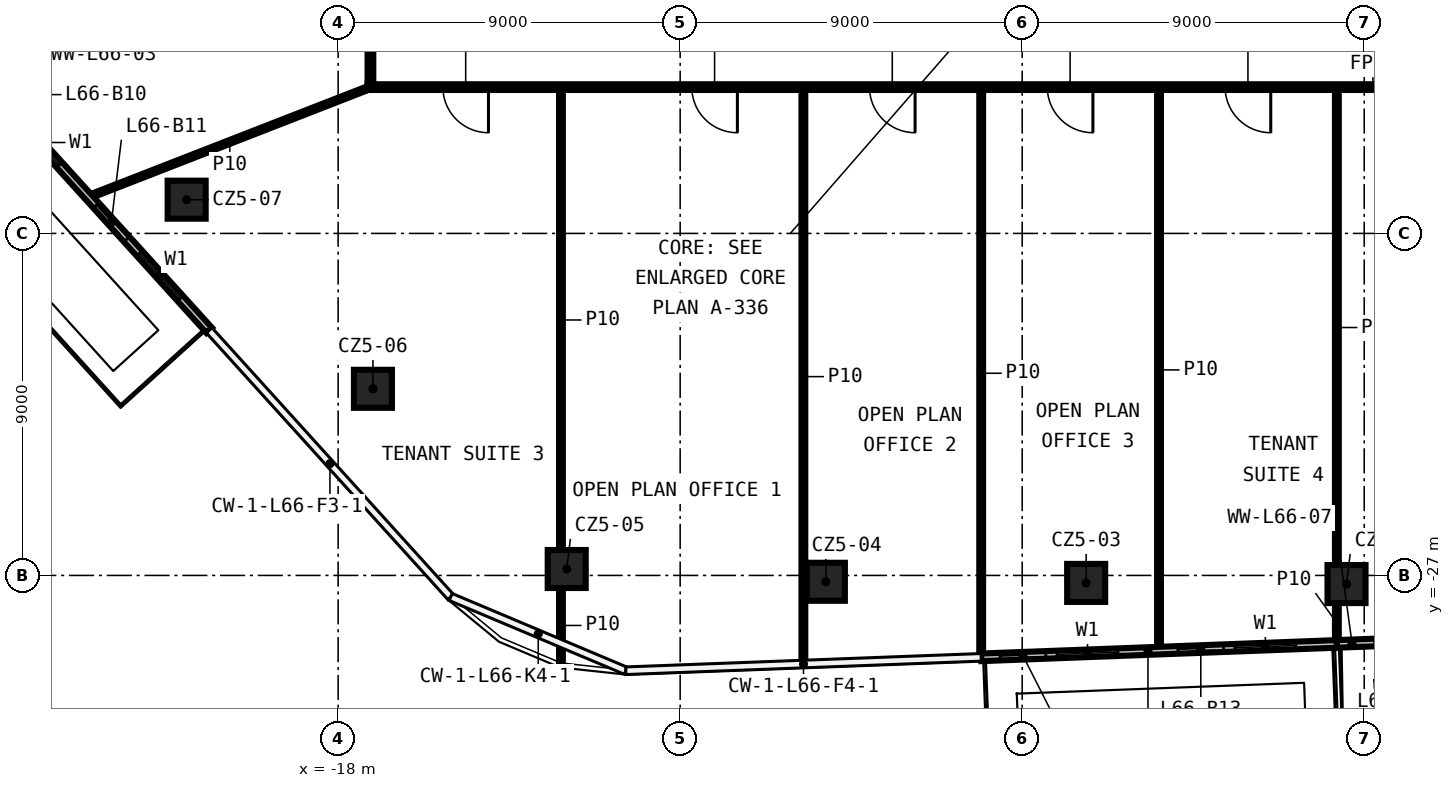
"""IFC4 building model, lengths in metres.
Left out: names, types, materials, properties, quantities, classifications, styles, units other than length and angle.
Written with IfcOpenShell. Run it as: python <this file> out.ifc"""

import sys

from ifc_helpers import new_model, si_unit, direction, frame, frame_2d, origin, origin_2d, place, context, subcontext, project, spatial, rectangle, extrude, element, fill, save


model = new_model("IFC4")
c1 = context("Model", 3, precision=1e-05, world=origin(), true_north=direction((0.0, 1.0)))
c2 = subcontext(c1, "Body", "Model", "MODEL_VIEW")
j1 = project(units=[si_unit("LENGTHUNIT", "METRE"), si_unit("PLANEANGLEUNIT", "RADIAN")], contexts=[c1])
p1 = place(None, origin())
s1 = spatial("IfcSite", under=j1, at=p1, CompositionType="ELEMENT")
p2 = place(p1, origin())
s2 = spatial("IfcBuilding", under=s1, at=p2, CompositionType="ELEMENT")
p3 = place(p2, frame((0.0, 0.0, 311.0)))
s3 = spatial("IfcBuildingStorey", under=s2, at=p3, CompositionType="ELEMENT", Elevation=311.0)
for number, where, z_axis, x_axis in (
    (1, (8.534, -27.227, 0.0), (0.0, 0.0, 1.0), (1.0, 0.0, 0.0)),
    (2, (1.683, -27.197, 0.0), (0.0, 0.0, 1.0), (1.0, 0.0, 0.0)),
    (3, (-5.166, -27.167, 0.0), (0.0, 0.0, 1.0), (1.0, 0.0, 0.0)),
    (4, (-11.985, -26.831, 0.0), (0.0, 0.0, 1.0), (1.0, 0.0, 0.0)),
    (5, (-17.084, -22.089, 0.0), (0.0, 0.0, 1.0), (1.0, 0.0, 0.0)),
    (6, (-21.986, -17.112, 0.0), (0.0, 0.0, 1.0), (1.0, 0.0, 0.0)),
):
    element("IfcColumn", number, at=place(p3, frame(where, z_axis=z_axis, x_axis=x_axis)), inside=s3, PredefinedType="COLUMN", context=c2, shape_type="SweptSolid", body=[
        extrude(rectangle(XDim=1.0, YDim=1.0, at=origin_2d()), origin(), (0.0, 0.0, 1.0), 3.82),
    ])
p4 = place(p3, frame((17.225, -14.15, 0.0), z_axis=(0.0, 0.0, 1.0), x_axis=(-1.0, 0.0, 0.0)))
e7 = element("IfcWall", 7, at=p4, inside=s3, PredefinedType="PARTITIONING", context=c2, shape_type="SweptSolid", body=[
    extrude(rectangle(XDim=34.45, YDim=0.15, at=frame_2d((17.225, 0.0))), origin(), (0.0, 0.0, 1.0), 3.82),
])
p5 = place(p4, frame((31.269, 0.0, 0.0)))
e8 = element("IfcOpeningElement", 8, at=p5, cuts=e7, PredefinedType="OPENING", context=c2, shape_type="SweptSolid", body=[
    extrude(rectangle(XDim=1.2, YDim=2.1, at=frame_2d((0.6, 1.05))), frame((0.0, 0.085, 0.0), z_axis=(0.0, -1.0, 0.0), x_axis=(1.0, 0.0, 0.0)), (0.0, 0.0, 1.0), 0.17),
])
p6 = place(p4, frame((24.719, 0.0, 0.0)))
e9 = element("IfcOpeningElement", 9, at=p6, cuts=e7, PredefinedType="OPENING", context=c2, shape_type="SweptSolid", body=[
    extrude(rectangle(XDim=1.2, YDim=2.1, at=frame_2d((0.6, 1.05))), frame((0.0, 0.085, 0.0), z_axis=(0.0, -1.0, 0.0), x_axis=(1.0, 0.0, 0.0)), (0.0, 0.0, 1.0), 0.17),
])
p7 = place(p4, frame((20.044, 0.0, 0.0)))
e10 = element("IfcOpeningElement", 10, at=p7, cuts=e7, PredefinedType="OPENING", context=c2, shape_type="SweptSolid", body=[
    extrude(rectangle(XDim=1.2, YDim=2.1, at=frame_2d((0.6, 1.05))), frame((0.0, 0.085, 0.0), z_axis=(0.0, -1.0, 0.0), x_axis=(1.0, 0.0, 0.0)), (0.0, 0.0, 1.0), 0.17),
])
p8 = place(p4, frame((15.364, 0.0, 0.0)))
e11 = element("IfcOpeningElement", 11, at=p8, cuts=e7, PredefinedType="OPENING", context=c2, shape_type="SweptSolid", body=[
    extrude(rectangle(XDim=1.2, YDim=2.1, at=frame_2d((0.6, 1.05))), frame((0.0, 0.085, 0.0), z_axis=(0.0, -1.0, 0.0), x_axis=(1.0, 0.0, 0.0)), (0.0, 0.0, 1.0), 0.17),
])
p9 = place(p4, frame((10.685, 0.0, 0.0)))
e12 = element("IfcOpeningElement", 12, at=p9, cuts=e7, PredefinedType="OPENING", context=c2, shape_type="SweptSolid", body=[
    extrude(rectangle(XDim=1.2, YDim=2.1, at=frame_2d((0.6, 1.05))), frame((0.0, 0.085, 0.0), z_axis=(0.0, -1.0, 0.0), x_axis=(1.0, 0.0, 0.0)), (0.0, 0.0, 1.0), 0.17),
])
p10 = place(p4, frame((4.107, 0.0, 0.0)))
e13 = element("IfcOpeningElement", 13, at=p10, cuts=e7, PredefinedType="OPENING", context=c2, shape_type="SweptSolid", body=[
    extrude(rectangle(XDim=1.2, YDim=2.1, at=frame_2d((0.6, 1.05))), frame((0.0, 0.085, 0.0), z_axis=(0.0, -1.0, 0.0), x_axis=(1.0, 0.0, 0.0)), (0.0, 0.0, 1.0), 0.17),
])
p11 = place(p3, frame((-24.55, -17.033, 0.0), z_axis=(0.0, 0.0, 1.0), x_axis=(0.931751191714, 0.363097392911, 0.0)))
e14 = element("IfcWall", 14, at=p11, inside=s3, PredefinedType="PARTITIONING", context=c2, shape_type="SweptSolid", body=[
    extrude(rectangle(XDim=7.942, YDim=0.1, at=frame_2d((3.971, 0.0))), origin(), (0.0, 0.0, 1.0), 3.82),
])
p12 = place(p3, frame((8.28, -28.782, 0.0), z_axis=(0.0, 0.0, 1.0), x_axis=(0.0, 1.0, 0.0)))
e15 = element("IfcWall", 15, at=p12, inside=s3, PredefinedType="PARTITIONING", context=c2, shape_type="SweptSolid", body=[
    extrude(rectangle(XDim=1.055, YDim=0.1, at=frame_2d((0.528, 0.0))), origin(), (0.0, 0.0, 1.0), 3.82),
])
p13 = place(p3, frame((8.28, -26.727, 0.0), z_axis=(0.0, 0.0, 1.0), x_axis=(0.0, 1.0, 0.0)))
e16 = element("IfcWall", 16, at=p13, inside=s3, PredefinedType="PARTITIONING", context=c2, shape_type="SweptSolid", body=[
    extrude(rectangle(XDim=12.502, YDim=0.1, at=frame_2d((6.251, 0.0))), origin(), (0.0, 0.0, 1.0), 3.82),
])
p14 = place(p3, frame((3.6, -28.959, 0.0), z_axis=(0.0, 0.0, 1.0), x_axis=(0.0, 1.0, 0.0)))
e17 = element("IfcWall", 17, at=p14, inside=s3, PredefinedType="PARTITIONING", context=c2, shape_type="SweptSolid", body=[
    extrude(rectangle(XDim=14.734, YDim=0.1, at=frame_2d((7.367, 0.0))), origin(), (0.0, 0.0, 1.0), 3.82),
])
p15 = place(p3, frame((-1.079, -29.135, 0.0), z_axis=(0.0, 0.0, 1.0), x_axis=(0.0, 1.0, 0.0)))
e18 = element("IfcWall", 18, at=p15, inside=s3, PredefinedType="PARTITIONING", context=c2, shape_type="SweptSolid", body=[
    extrude(rectangle(XDim=14.91, YDim=0.1, at=frame_2d((7.455, 0.0))), origin(), (0.0, 0.0, 1.0), 3.82),
])
p16 = place(p3, frame((-5.758, -29.312, 0.0), z_axis=(0.0, 0.0, 1.0), x_axis=(0.0, 1.0, 0.0)))
e19 = element("IfcWall", 19, at=p16, inside=s3, PredefinedType="PARTITIONING", context=c2, shape_type="SweptSolid", body=[
    extrude(rectangle(XDim=15.087, YDim=0.1, at=frame_2d((7.543, 0.0))), origin(), (0.0, 0.0, 1.0), 3.82),
])
p17 = place(p3, frame((-12.137, -29.302, 0.0), z_axis=(0.0, 0.0, 1.0), x_axis=(0.0, 1.0, 0.0)))
e20 = element("IfcWall", 20, at=p17, inside=s3, PredefinedType="PARTITIONING", context=c2, shape_type="SweptSolid", body=[
    extrude(rectangle(XDim=1.971, YDim=0.1, at=frame_2d((0.985, 0.0))), origin(), (0.0, 0.0, 1.0), 3.82),
])
p18 = place(p3, frame((-12.137, -26.331, 0.0), z_axis=(0.0, 0.0, 1.0), x_axis=(0.0, 1.0, 0.0)))
e21 = element("IfcWall", 21, at=p18, inside=s3, PredefinedType="PARTITIONING", context=c2, shape_type="SweptSolid", body=[
    extrude(rectangle(XDim=12.106, YDim=0.1, at=frame_2d((6.053, 0.0))), origin(), (0.0, 0.0, 1.0), 3.82),
])
p19 = place(p3, frame((-17.15, -14.075, 0.0), z_axis=(0.0, 0.0, 1.0), x_axis=(0.0, 1.0, 0.0)))
e22 = element("IfcWall", 22, at=p19, inside=s3, PredefinedType="PARTITIONING", context=c2, shape_type="SweptSolid", body=[
    extrude(rectangle(XDim=28.15, YDim=0.15, at=frame_2d((14.075, 0.0))), origin(), (0.0, 0.0, 1.0), 3.82),
])
p20 = place(p19, frame((10.867, 0.0, 0.0)))
e23 = element("IfcOpeningElement", 23, at=p20, cuts=e22, PredefinedType="OPENING", context=c2, shape_type="SweptSolid", body=[
    extrude(rectangle(XDim=1.2, YDim=2.1, at=frame_2d((0.6, 1.05))), frame((0.0, 0.085, 0.0), z_axis=(0.0, -1.0, 0.0), x_axis=(1.0, 0.0, 0.0)), (0.0, 0.0, 1.0), 0.17),
])
p21 = place(p19, frame((3.801, 0.0, 0.0)))
e24 = element("IfcOpeningElement", 24, at=p21, cuts=e22, PredefinedType="OPENING", context=c2, shape_type="SweptSolid", body=[
    extrude(rectangle(XDim=1.2, YDim=2.1, at=frame_2d((0.6, 1.05))), frame((0.0, 0.085, 0.0), z_axis=(0.0, -1.0, 0.0), x_axis=(1.0, 0.0, 0.0)), (0.0, 0.0, 1.0), 0.17),
])
p22 = place(p19, frame((18.279, 0.0, 0.0)))
e25 = element("IfcOpeningElement", 25, at=p22, cuts=e22, PredefinedType="OPENING", context=c2, shape_type="SweptSolid", body=[
    extrude(rectangle(XDim=1.2, YDim=2.1, at=frame_2d((0.6, 1.05))), frame((0.0, 0.085, 0.0), z_axis=(0.0, -1.0, 0.0), x_axis=(1.0, 0.0, 0.0)), (0.0, 0.0, 1.0), 0.17),
])
p23 = place(p3, frame((-30.926, -10.023, 0.0), z_axis=(0.0, 0.0, 1.0), x_axis=(0.671222052588, -0.74125633631, 0.0)))
e26 = element("IfcWall", 26, at=p23, inside=s3, PredefinedType="SOLIDWALL", context=c2, shape_type="SweptSolid", body=[
    extrude(rectangle(XDim=14.202, YDim=0.2, at=frame_2d((7.101, 0.0))), origin(), (0.0, 0.0, 1.0), 3.82),
])
p24 = place(p23, frame((2.0, 0.0, 0.6)))
e27 = element("IfcOpeningElement", 27, at=p24, cuts=e26, PredefinedType="OPENING", context=c2, shape_type="SweptSolid", body=[
    extrude(rectangle(XDim=1.6, YDim=2.4, at=frame_2d((0.8, 1.2))), frame((0.0, 0.11, 0.0), z_axis=(0.0, -1.0, 0.0), x_axis=(1.0, 0.0, 0.0)), (0.0, 0.0, 1.0), 0.22),
])
p25 = place(p23, frame((0.5, 0.0, 0.0)))
e28 = element("IfcOpeningElement", 28, at=p25, cuts=e26, PredefinedType="OPENING", context=c2, shape_type="SweptSolid", body=[
    extrude(rectangle(XDim=1.2, YDim=2.4, at=frame_2d((0.6, 1.2))), frame((0.0, 0.11, 0.0), z_axis=(0.0, -1.0, 0.0), x_axis=(1.0, 0.0, 0.0)), (0.0, 0.0, 1.0), 0.22),
])
p26 = place(p23, frame((6.734, 0.0, 0.6)))
e29 = element("IfcOpeningElement", 29, at=p26, cuts=e26, PredefinedType="OPENING", context=c2, shape_type="SweptSolid", body=[
    extrude(rectangle(XDim=1.6, YDim=2.4, at=frame_2d((0.8, 1.2))), frame((0.0, 0.11, 0.0), z_axis=(0.0, -1.0, 0.0), x_axis=(1.0, 0.0, 0.0)), (0.0, 0.0, 1.0), 0.22),
])
p27 = place(p23, frame((5.234, 0.0, 0.0)))
e30 = element("IfcOpeningElement", 30, at=p27, cuts=e26, PredefinedType="OPENING", context=c2, shape_type="SweptSolid", body=[
    extrude(rectangle(XDim=1.2, YDim=2.4, at=frame_2d((0.6, 1.2))), frame((0.0, 0.11, 0.0), z_axis=(0.0, -1.0, 0.0), x_axis=(1.0, 0.0, 0.0)), (0.0, 0.0, 1.0), 0.22),
])
p28 = place(p23, frame((11.468, 0.0, 0.6)))
e31 = element("IfcOpeningElement", 31, at=p28, cuts=e26, PredefinedType="OPENING", context=c2, shape_type="SweptSolid", body=[
    extrude(rectangle(XDim=1.6, YDim=2.4, at=frame_2d((0.8, 1.2))), frame((0.0, 0.11, 0.0), z_axis=(0.0, -1.0, 0.0), x_axis=(1.0, 0.0, 0.0)), (0.0, 0.0, 1.0), 0.22),
])
p29 = place(p23, frame((9.768, 0.0, 0.0)))
e32 = element("IfcOpeningElement", 32, at=p29, cuts=e26, PredefinedType="OPENING", context=c2, shape_type="SweptSolid", body=[
    extrude(rectangle(XDim=1.2, YDim=2.4, at=frame_2d((0.6, 1.2))), frame((0.0, 0.11, 0.0), z_axis=(0.0, -1.0, 0.0), x_axis=(1.0, 0.0, 0.0)), (0.0, 0.0, 1.0), 0.22),
])
p30 = place(p3, frame((-1.079, -29.156, 0.0), z_axis=(0.0, 0.0, 1.0), x_axis=(0.999288261827, 0.037722271597, 0.0)))
e33 = element("IfcWall", 33, at=p30, inside=s3, PredefinedType="SOLIDWALL", context=c2, shape_type="SweptSolid", body=[
    extrude(rectangle(XDim=9.365, YDim=0.2, at=frame_2d((4.683, 0.0))), origin(), (0.0, 0.0, 1.0), 3.82),
])
p31 = place(p30, frame((2.0, 0.0, 0.6)))
e34 = element("IfcOpeningElement", 34, at=p31, cuts=e33, PredefinedType="OPENING", context=c2, shape_type="SweptSolid", body=[
    extrude(rectangle(XDim=1.6, YDim=2.4, at=frame_2d((0.8, 1.2))), frame((0.0, 0.11, 0.0), z_axis=(0.0, -1.0, 0.0), x_axis=(1.0, 0.0, 0.0)), (0.0, 0.0, 1.0), 0.22),
])
p32 = place(p30, frame((0.5, 0.0, 0.0)))
e35 = element("IfcOpeningElement", 35, at=p32, cuts=e33, PredefinedType="OPENING", context=c2, shape_type="SweptSolid", body=[
    extrude(rectangle(XDim=1.2, YDim=2.4, at=frame_2d((0.6, 1.2))), frame((0.0, 0.11, 0.0), z_axis=(0.0, -1.0, 0.0), x_axis=(1.0, 0.0, 0.0)), (0.0, 0.0, 1.0), 0.22),
])
p33 = place(p30, frame((6.683, 0.0, 0.6)))
e36 = element("IfcOpeningElement", 36, at=p33, cuts=e33, PredefinedType="OPENING", context=c2, shape_type="SweptSolid", body=[
    extrude(rectangle(XDim=1.6, YDim=2.4, at=frame_2d((0.8, 1.2))), frame((0.0, 0.11, 0.0), z_axis=(0.0, -1.0, 0.0), x_axis=(1.0, 0.0, 0.0)), (0.0, 0.0, 1.0), 0.22),
])
p34 = place(p30, frame((5.183, 0.0, 0.0)))
e37 = element("IfcOpeningElement", 37, at=p34, cuts=e33, PredefinedType="OPENING", context=c2, shape_type="SweptSolid", body=[
    extrude(rectangle(XDim=1.2, YDim=2.4, at=frame_2d((0.6, 1.2))), frame((0.0, 0.11, 0.0), z_axis=(0.0, -1.0, 0.0), x_axis=(1.0, 0.0, 0.0)), (0.0, 0.0, 1.0), 0.22),
])
p35 = place(p3, frame((8.28, -28.802, 0.0), z_axis=(0.0, 0.0, 1.0), x_axis=(0.999288539502, 0.037714915082, 0.0)))
e38 = element("IfcWall", 38, at=p35, inside=s3, PredefinedType="SOLIDWALL", context=c2, shape_type="SweptSolid", body=[
    extrude(rectangle(XDim=4.674, YDim=0.2, at=frame_2d((2.337, 0.0))), origin(), (0.0, 0.0, 1.0), 3.82),
])
p36 = place(p35, frame((2.5, 0.0, 0.6)))
e39 = element("IfcOpeningElement", 39, at=p36, cuts=e38, PredefinedType="OPENING", context=c2, shape_type="SweptSolid", body=[
    extrude(rectangle(XDim=1.6, YDim=2.4, at=frame_2d((0.8, 1.2))), frame((0.0, 0.11, 0.0), z_axis=(0.0, -1.0, 0.0), x_axis=(1.0, 0.0, 0.0)), (0.0, 0.0, 1.0), 0.22),
])
p37 = place(p35, frame((1.0, 0.0, 0.0)))
e40 = element("IfcOpeningElement", 40, at=p37, cuts=e38, PredefinedType="OPENING", context=c2, shape_type="SweptSolid", body=[
    extrude(rectangle(XDim=1.2, YDim=2.4, at=frame_2d((0.6, 1.2))), frame((0.0, 0.11, 0.0), z_axis=(0.0, -1.0, 0.0), x_axis=(1.0, 0.0, 0.0)), (0.0, 0.0, 1.0), 0.22),
])
p38 = place(p5, origin())
e41 = element("IfcDoor", 41, at=p38, inside=s3, OperationType="SINGLE_SWING_RIGHT", PredefinedType="DOOR", context=c2, shape_type="SweptSolid", body=[
    extrude(rectangle(XDim=1.2, YDim=2.1, at=frame_2d((0.6, 1.05))), frame((0.0, 0.025, 0.0), z_axis=(0.0, -1.0, 0.0), x_axis=(1.0, 0.0, 0.0)), (0.0, 0.0, 1.0), 0.05),
])
fill(e8, e41)
p39 = place(p6, origin())
e42 = element("IfcDoor", 42, at=p39, inside=s3, OperationType="SINGLE_SWING_LEFT", PredefinedType="DOOR", context=c2, shape_type="SweptSolid", body=[
    extrude(rectangle(XDim=1.2, YDim=2.1, at=frame_2d((0.6, 1.05))), frame((0.0, 0.025, 0.0), z_axis=(0.0, -1.0, 0.0), x_axis=(1.0, 0.0, 0.0)), (0.0, 0.0, 1.0), 0.05),
])
fill(e9, e42)
p40 = place(p7, origin())
e43 = element("IfcDoor", 43, at=p40, inside=s3, OperationType="SINGLE_SWING_RIGHT", PredefinedType="DOOR", context=c2, shape_type="SweptSolid", body=[
    extrude(rectangle(XDim=1.2, YDim=2.1, at=frame_2d((0.6, 1.05))), frame((0.0, 0.025, 0.0), z_axis=(0.0, -1.0, 0.0), x_axis=(1.0, 0.0, 0.0)), (0.0, 0.0, 1.0), 0.05),
])
fill(e10, e43)
p41 = place(p8, origin())
e44 = element("IfcDoor", 44, at=p41, inside=s3, OperationType="SINGLE_SWING_LEFT", PredefinedType="DOOR", context=c2, shape_type="SweptSolid", body=[
    extrude(rectangle(XDim=1.2, YDim=2.1, at=frame_2d((0.6, 1.05))), frame((0.0, 0.025, 0.0), z_axis=(0.0, -1.0, 0.0), x_axis=(1.0, 0.0, 0.0)), (0.0, 0.0, 1.0), 0.05),
])
fill(e11, e44)
p42 = place(p9, origin())
e45 = element("IfcDoor", 45, at=p42, inside=s3, OperationType="SINGLE_SWING_RIGHT", PredefinedType="DOOR", context=c2, shape_type="SweptSolid", body=[
    extrude(rectangle(XDim=1.2, YDim=2.1, at=frame_2d((0.6, 1.05))), frame((0.0, 0.025, 0.0), z_axis=(0.0, -1.0, 0.0), x_axis=(1.0, 0.0, 0.0)), (0.0, 0.0, 1.0), 0.05),
])
fill(e12, e45)
p43 = place(p26, origin())
e46 = element("IfcWindow", 46, at=p43, inside=s3, PartitioningType="SINGLE_PANEL", PredefinedType="WINDOW", context=c2, shape_type="SweptSolid", body=[
    extrude(rectangle(XDim=1.6, YDim=2.4, at=frame_2d((0.8, 1.2))), frame((0.0, 0.03, 0.0), z_axis=(0.0, -1.0, 0.0), x_axis=(1.0, 0.0, 0.0)), (0.0, 0.0, 1.0), 0.06),
])
fill(e29, e46)
p44 = place(p28, origin())
e47 = element("IfcWindow", 47, at=p44, inside=s3, PartitioningType="SINGLE_PANEL", PredefinedType="WINDOW", context=c2, shape_type="SweptSolid", body=[
    extrude(rectangle(XDim=1.6, YDim=2.4, at=frame_2d((0.8, 1.2))), frame((0.0, 0.03, 0.0), z_axis=(0.0, -1.0, 0.0), x_axis=(1.0, 0.0, 0.0)), (0.0, 0.0, 1.0), 0.06),
])
fill(e31, e47)
p45 = place(p29, origin())
e48 = element("IfcDoor", 48, at=p45, inside=s3, OperationType="SLIDING_TO_LEFT", PredefinedType="DOOR", context=c2, shape_type="SweptSolid", body=[
    extrude(rectangle(XDim=1.2, YDim=2.4, at=frame_2d((0.6, 1.2))), frame((0.0, 0.025, 0.0), z_axis=(0.0, -1.0, 0.0), x_axis=(1.0, 0.0, 0.0)), (0.0, 0.0, 1.0), 0.05),
])
fill(e32, e48)
p46 = place(p31, origin())
e49 = element("IfcWindow", 49, at=p46, inside=s3, PartitioningType="SINGLE_PANEL", PredefinedType="WINDOW", context=c2, shape_type="SweptSolid", body=[
    extrude(rectangle(XDim=1.6, YDim=2.4, at=frame_2d((0.8, 1.2))), frame((0.0, 0.03, 0.0), z_axis=(0.0, -1.0, 0.0), x_axis=(1.0, 0.0, 0.0)), (0.0, 0.0, 1.0), 0.06),
])
fill(e34, e49)
p47 = place(p32, origin())
e50 = element("IfcDoor", 50, at=p47, inside=s3, OperationType="SLIDING_TO_LEFT", PredefinedType="DOOR", context=c2, shape_type="SweptSolid", body=[
    extrude(rectangle(XDim=1.2, YDim=2.4, at=frame_2d((0.6, 1.2))), frame((0.0, 0.025, 0.0), z_axis=(0.0, -1.0, 0.0), x_axis=(1.0, 0.0, 0.0)), (0.0, 0.0, 1.0), 0.05),
])
fill(e35, e50)
p48 = place(p33, origin())
e51 = element("IfcWindow", 51, at=p48, inside=s3, PartitioningType="SINGLE_PANEL", PredefinedType="WINDOW", context=c2, shape_type="SweptSolid", body=[
    extrude(rectangle(XDim=1.6, YDim=2.4, at=frame_2d((0.8, 1.2))), frame((0.0, 0.03, 0.0), z_axis=(0.0, -1.0, 0.0), x_axis=(1.0, 0.0, 0.0)), (0.0, 0.0, 1.0), 0.06),
])
fill(e36, e51)
p49 = place(p34, origin())
e52 = element("IfcDoor", 52, at=p49, inside=s3, OperationType="SLIDING_TO_LEFT", PredefinedType="DOOR", context=c2, shape_type="SweptSolid", body=[
    extrude(rectangle(XDim=1.2, YDim=2.4, at=frame_2d((0.6, 1.2))), frame((0.0, 0.025, 0.0), z_axis=(0.0, -1.0, 0.0), x_axis=(1.0, 0.0, 0.0)), (0.0, 0.0, 1.0), 0.05),
])
fill(e37, e52)
p50 = place(p37, origin())
e53 = element("IfcDoor", 53, at=p50, inside=s3, OperationType="SLIDING_TO_LEFT", PredefinedType="DOOR", context=c2, shape_type="SweptSolid", body=[
    extrude(rectangle(XDim=1.2, YDim=2.4, at=frame_2d((0.6, 1.2))), frame((0.0, 0.025, 0.0), z_axis=(0.0, -1.0, 0.0), x_axis=(1.0, 0.0, 0.0)), (0.0, 0.0, 1.0), 0.05),
])
fill(e40, e53)
save(model, sys.argv[1])
